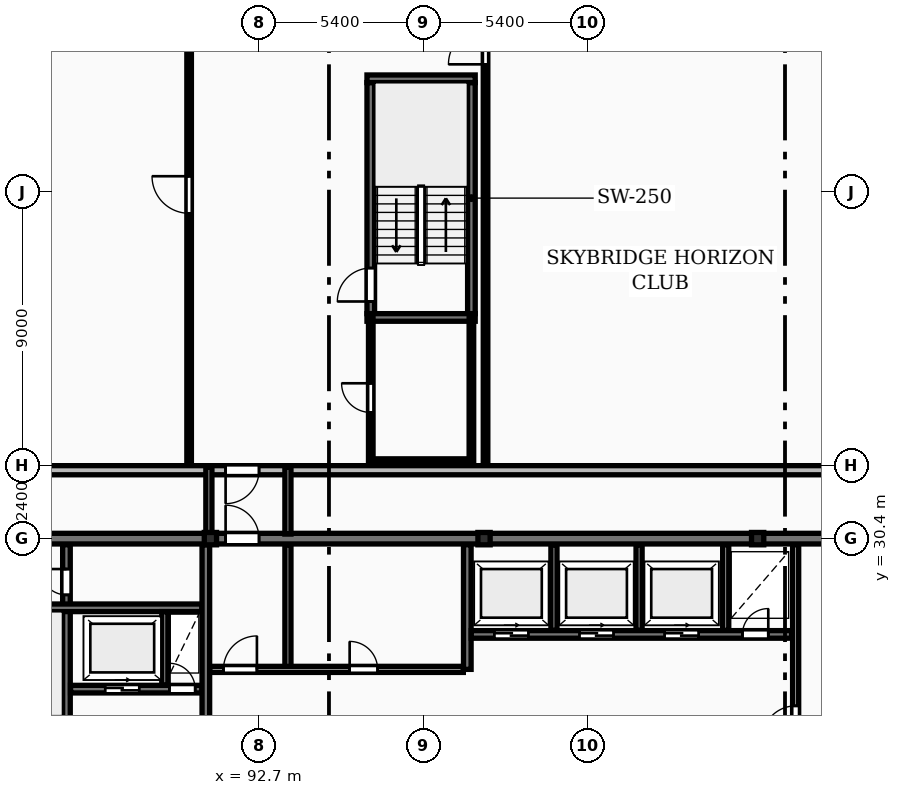
"""IFC4 building model, lengths in metres.
Left out: names, types, materials, properties, quantities, classifications, styles, units other than length and angle.
Written with IfcOpenShell. Run it as: python <this file> out.ifc"""

import sys

from ifc_helpers import new_model, si_unit, direction, frame, frame_2d, origin, origin_2d, place, context, subcontext, project, spatial, rectangle, i_section, extrude, element, fill, save


model = new_model("IFC4")
c1 = context("Model", 3, precision=1e-05, world=origin(), true_north=direction((0.0, 1.0)))
c2 = subcontext(c1, "Body", "Model", "MODEL_VIEW")
j1 = project(units=[si_unit("LENGTHUNIT", "METRE"), si_unit("PLANEANGLEUNIT", "RADIAN")], contexts=[c1])
p1 = place(None, origin())
s1 = spatial("IfcSite", under=j1, at=p1, CompositionType="ELEMENT")
p2 = place(p1, origin())
s2 = spatial("IfcBuilding", under=s1, at=p2, CompositionType="ELEMENT")
p3 = place(p2, frame((0.0, 0.0, 146.5)))
s3 = spatial("IfcBuildingStorey", under=s2, at=p3, CompositionType="ELEMENT", Elevation=146.5)
for number, where, z_axis, x_axis in (
    (1, (91.1, 30.4, 0.0), (0.0, 0.0, 1.0), (1.0, 0.0, 0.0)),
    (2, (100.1, 30.4, 0.0), (0.0, 0.0, 1.0), (1.0, 0.0, 0.0)),
    (3, (109.1, 30.4, 0.0), (0.0, 0.0, 1.0), (1.0, 0.0, 0.0)),
):
    element("IfcColumn", number, at=place(p3, frame(where, z_axis=z_axis, x_axis=x_axis)), inside=s3, PredefinedType="COLUMN", context=c2, shape_type="SweptSolid", body=[
        extrude(i_section(OverallWidth=0.403, OverallDepth=0.406, WebThickness=0.027, FlangeThickness=0.043, FilletRadius=0.015, at=origin_2d()), origin(), (0.0, 0.0, 1.0), 3.6),
    ])
p4 = place(p3, frame((130.7, 32.65, 0.0), z_axis=(0.0, 0.0, 1.0), x_axis=(-1.0, 0.0, 0.0)))
e4 = element("IfcWall", 4, at=p4, inside=s3, PredefinedType="STANDARD", context=c2, shape_type="SweptSolid", body=[
    extrude(rectangle(XDim=58.0, YDim=0.3, at=frame_2d((29.0, 0.0))), origin(), (0.0, 0.0, 1.0), 3.31),
])
p5 = place(p4, frame((50.125, 0.0, 0.85)))
e5 = element("IfcOpeningElement", 5, at=p5, cuts=e4, PredefinedType="OPENING", context=c2, shape_type="SweptSolid", body=[
    extrude(rectangle(XDim=1.8, YDim=1.8, at=frame_2d((0.9, 0.9))), frame((0.0, 0.16, 0.0), z_axis=(0.0, -1.0, 0.0), x_axis=(1.0, 0.0, 0.0)), (0.0, 0.0, 1.0), 0.32),
])
p6 = place(p4, frame((6.775, 0.0, 0.85)))
e6 = element("IfcOpeningElement", 6, at=p6, cuts=e4, PredefinedType="OPENING", context=c2, shape_type="SweptSolid", body=[
    extrude(rectangle(XDim=1.8, YDim=1.8, at=frame_2d((0.9, 0.9))), frame((0.0, 0.16, 0.0), z_axis=(0.0, -1.0, 0.0), x_axis=(1.0, 0.0, 0.0)), (0.0, 0.0, 1.0), 0.32),
])
p7 = place(p4, frame((38.0, 0.0, 0.0)))
e7 = element("IfcOpeningElement", 7, at=p7, cuts=e4, PredefinedType="OPENING", context=c2, shape_type="SweptSolid", body=[
    extrude(rectangle(XDim=1.1, YDim=2.1, at=frame_2d((0.55, 1.05))), frame((0.0, 0.16, 0.0), z_axis=(0.0, -1.0, 0.0), x_axis=(1.0, 0.0, 0.0)), (0.0, 0.0, 1.0), 0.32),
])
p8 = place(p3, frame((81.925, 30.4, 0.0), z_axis=(0.0, 0.0, 1.0), x_axis=(1.0, 0.0, 0.0)))
e8 = element("IfcWall", 8, at=p8, inside=s3, PredefinedType="SHEAR", context=c2, shape_type="SweptSolid", body=[
    extrude(rectangle(XDim=36.265, YDim=0.35, at=frame_2d((18.132, 0.0))), origin(), (0.0, 0.0, 1.0), 3.6),
])
p9 = place(p8, frame((9.675, 0.0, 0.0)))
e9 = element("IfcOpeningElement", 9, at=p9, cuts=e8, PredefinedType="OPENING", context=c2, shape_type="SweptSolid", body=[
    extrude(rectangle(XDim=1.1, YDim=2.1, at=frame_2d((0.55, 1.05))), frame((0.0, 0.185, 0.0), z_axis=(0.0, -1.0, 0.0), x_axis=(1.0, 0.0, 0.0)), (0.0, 0.0, 1.0), 0.37),
])
p10 = place(p3, frame((86.365, 18.6, 0.0), z_axis=(0.0, 0.0, 1.0), x_axis=(0.0, 1.0, 0.0)))
e10 = element("IfcWall", 10, at=p10, inside=s3, PredefinedType="SHEAR", context=c2, shape_type="SweptSolid", body=[
    extrude(rectangle(XDim=11.6, YDim=0.25, at=frame_2d((5.8, 0.0))), origin(), (0.0, 0.0, 1.0), 3.6),
])
p11 = place(p10, frame((0.45, 0.0, 0.0)))
e11 = element("IfcOpeningElement", 11, at=p11, cuts=e10, PredefinedType="OPENING", context=c2, shape_type="SweptSolid", body=[
    extrude(rectangle(XDim=0.85, YDim=2.05, at=frame_2d((0.425, 1.025))), frame((0.0, 0.135, 0.0), z_axis=(0.0, -1.0, 0.0), x_axis=(1.0, 0.0, 0.0)), (0.0, 0.0, 1.0), 0.27),
])
p12 = place(p10, frame((2.05, 0.0, 0.0)))
e12 = element("IfcOpeningElement", 12, at=p12, cuts=e10, PredefinedType="OPENING", context=c2, shape_type="SweptSolid", body=[
    extrude(rectangle(XDim=1.1, YDim=2.1, at=frame_2d((0.55, 1.05))), frame((0.0, 0.135, 0.0), z_axis=(0.0, -1.0, 0.0), x_axis=(1.0, 0.0, 0.0)), (0.0, 0.0, 1.0), 0.27),
])
p13 = place(p10, frame((9.95, 0.0, 0.0)))
e13 = element("IfcOpeningElement", 13, at=p13, cuts=e10, PredefinedType="OPENING", context=c2, shape_type="SweptSolid", body=[
    extrude(rectangle(XDim=0.85, YDim=2.05, at=frame_2d((0.425, 1.025))), frame((0.0, 0.135, 0.0), z_axis=(0.0, -1.0, 0.0), x_axis=(1.0, 0.0, 0.0)), (0.0, 0.0, 1.0), 0.27),
])
p14 = place(p3, frame((83.0, 28.125, 0.0), z_axis=(0.0, 0.0, 1.0), x_axis=(1.0, 0.0, 0.0)))
e14 = element("IfcWall", 14, at=p14, inside=s3, PredefinedType="SHEAR", context=c2, shape_type="SweptSolid", body=[
    extrude(rectangle(XDim=7.82, YDim=0.25, at=frame_2d((3.91, 0.0))), origin(), (0.0, 0.0, 1.0), 3.6),
])
p15 = place(p3, frame((86.5, 25.45, 0.0), z_axis=(0.0, 0.0, 1.0), x_axis=(1.0, 0.0, 0.0)))
e15 = element("IfcWall", 15, at=p15, inside=s3, PredefinedType="SHEAR", context=c2, shape_type="SweptSolid", body=[
    extrude(rectangle(XDim=4.32, YDim=0.25, at=frame_2d((2.16, 0.0))), origin(), (0.0, 0.0, 1.0), 3.6),
])
p16 = place(p15, frame((1.14, 0.0, 0.0)))
e16 = element("IfcOpeningElement", 16, at=p16, cuts=e15, PredefinedType="OPENING", context=c2, shape_type="SweptSolid", body=[
    extrude(rectangle(XDim=1.12, YDim=2.12, at=frame_2d((0.56, 1.06))), frame((0.0, 0.135, 0.0), z_axis=(0.0, -1.0, 0.0), x_axis=(1.0, 0.0, 0.0)), (0.0, 0.0, 1.0), 0.27),
])
p17 = place(p15, frame((3.25, 0.0, 0.0)))
e17 = element("IfcOpeningElement", 17, at=p17, cuts=e15, PredefinedType="OPENING", context=c2, shape_type="SweptSolid", body=[
    extrude(rectangle(XDim=0.85, YDim=2.05, at=frame_2d((0.425, 1.025))), frame((0.0, 0.135, 0.0), z_axis=(0.0, -1.0, 0.0), x_axis=(1.0, 0.0, 0.0)), (0.0, 0.0, 1.0), 0.27),
])
p18 = place(p3, frame((89.6, 25.58, 0.0), z_axis=(0.0, 0.0, 1.0), x_axis=(0.0, 1.0, 0.0)))
e18 = element("IfcWall", 18, at=p18, inside=s3, PredefinedType="PARTITIONING", context=c2, shape_type="SweptSolid", body=[
    extrude(rectangle(XDim=2.42, YDim=0.2, at=frame_2d((1.21, 0.0))), origin(), (0.0, 0.0, 1.0), 3.31),
])
p19 = place(p3, frame((90.95, 18.6, 0.0), z_axis=(0.0, 0.0, 1.0), x_axis=(0.0, 1.0, 0.0)))
e19 = element("IfcWall", 19, at=p19, inside=s3, PredefinedType="SHEAR", context=c2, shape_type="SweptSolid", body=[
    extrude(rectangle(XDim=11.6, YDim=0.25, at=frame_2d((5.8, 0.0))), origin(), (0.0, 0.0, 1.0), 3.6),
])
p20 = place(p19, frame((4.6, 0.0, 0.0)))
e20 = element("IfcOpeningElement", 20, at=p20, cuts=e19, PredefinedType="OPENING", context=c2, shape_type="SweptSolid", body=[
    extrude(rectangle(XDim=1.1, YDim=2.1, at=frame_2d((0.55, 1.05))), frame((0.0, 0.135, 0.0), z_axis=(0.0, -1.0, 0.0), x_axis=(1.0, 0.0, 0.0)), (0.0, 0.0, 1.0), 0.27),
])
p21 = place(p3, frame((93.65, 26.1, 0.0), z_axis=(0.0, 0.0, 1.0), x_axis=(0.0, 1.0, 0.0)))
e21 = element("IfcWall", 21, at=p21, inside=s3, PredefinedType="PARTITIONING", context=c2, shape_type="SweptSolid", body=[
    extrude(rectangle(XDim=4.1, YDim=0.2, at=frame_2d((2.05, 0.0))), origin(), (0.0, 0.0, 1.0), 3.31),
])
p22 = place(p3, frame((91.08, 26.1, 0.0), z_axis=(0.0, 0.0, 1.0), x_axis=(1.0, 0.0, 0.0)))
e22 = element("IfcWall", 22, at=p22, inside=s3, PredefinedType="PARTITIONING", context=c2, shape_type="SweptSolid", body=[
    extrude(rectangle(XDim=8.34, YDim=0.2, at=frame_2d((4.17, 0.0))), origin(), (0.0, 0.0, 1.0), 3.31),
])
p23 = place(p22, frame((0.45, 0.0, 0.0)))
e23 = element("IfcOpeningElement", 23, at=p23, cuts=e22, PredefinedType="OPENING", context=c2, shape_type="SweptSolid", body=[
    extrude(rectangle(XDim=1.1, YDim=2.1, at=frame_2d((0.55, 1.05))), frame((0.0, 0.11, 0.0), z_axis=(0.0, -1.0, 0.0), x_axis=(1.0, 0.0, 0.0)), (0.0, 0.0, 1.0), 0.22),
])
p24 = place(p22, frame((4.6, 0.0, 0.0)))
e24 = element("IfcOpeningElement", 24, at=p24, cuts=e22, PredefinedType="OPENING", context=c2, shape_type="SweptSolid", body=[
    extrude(rectangle(XDim=0.92, YDim=2.08, at=frame_2d((0.46, 1.04))), frame((0.0, 0.11, 0.0), z_axis=(0.0, -1.0, 0.0), x_axis=(1.0, 0.0, 0.0)), (0.0, 0.0, 1.0), 0.22),
])
p25 = place(p3, frame((99.55, 26.1, 0.0), z_axis=(0.0, 0.0, 1.0), x_axis=(0.0, 1.0, 0.0)))
e25 = element("IfcWall", 25, at=p25, inside=s3, PredefinedType="SHEAR", context=c2, shape_type="SweptSolid", body=[
    extrude(rectangle(XDim=4.1, YDim=0.25, at=frame_2d((2.05, 0.0))), origin(), (0.0, 0.0, 1.0), 3.6),
])
for number, where, z_axis, x_axis in (
    (26, (102.4, 27.38, 0.0), (0.0, 0.0, 1.0), (0.0, 1.0, 0.0)),
    (27, (105.2, 27.38, 0.0), (0.0, 0.0, 1.0), (0.0, 1.0, 0.0)),
    (28, (108.05, 27.38, 0.0), (0.0, 0.0, 1.0), (0.0, 1.0, 0.0)),
):
    element("IfcWall", number, at=place(p3, frame(where, z_axis=z_axis, x_axis=x_axis)), inside=s3, PredefinedType="PARTITIONING", context=c2, shape_type="SweptSolid", body=[
        extrude(rectangle(XDim=2.82, YDim=0.2, at=frame_2d((1.41, 0.0))), origin(), (0.0, 0.0, 1.0), 3.31),
    ])
p26 = place(p3, frame((99.68, 27.25, 0.0), z_axis=(0.0, 0.0, 1.0), x_axis=(1.0, 0.0, 0.0)))
e29 = element("IfcWall", 29, at=p26, inside=s3, PredefinedType="SHEAR", context=c2, shape_type="SweptSolid", body=[
    extrude(rectangle(XDim=10.54, YDim=0.25, at=frame_2d((5.27, 0.0))), origin(), (0.0, 0.0, 1.0), 3.6),
])
p27 = place(p26, frame((0.76, 0.0, 0.0)))
e30 = element("IfcOpeningElement", 30, at=p27, cuts=e29, PredefinedType="OPENING", context=c2, shape_type="SweptSolid", body=[
    extrude(rectangle(XDim=1.12, YDim=2.12, at=frame_2d((0.56, 1.06))), frame((0.0, 0.135, 0.0), z_axis=(0.0, -1.0, 0.0), x_axis=(1.0, 0.0, 0.0)), (0.0, 0.0, 1.0), 0.27),
])
p28 = place(p26, frame((3.56, 0.0, 0.0)))
e31 = element("IfcOpeningElement", 31, at=p28, cuts=e29, PredefinedType="OPENING", context=c2, shape_type="SweptSolid", body=[
    extrude(rectangle(XDim=1.12, YDim=2.12, at=frame_2d((0.56, 1.06))), frame((0.0, 0.135, 0.0), z_axis=(0.0, -1.0, 0.0), x_axis=(1.0, 0.0, 0.0)), (0.0, 0.0, 1.0), 0.27),
])
p29 = place(p26, frame((6.36, 0.0, 0.0)))
e32 = element("IfcOpeningElement", 32, at=p29, cuts=e29, PredefinedType="OPENING", context=c2, shape_type="SweptSolid", body=[
    extrude(rectangle(XDim=1.12, YDim=2.12, at=frame_2d((0.56, 1.06))), frame((0.0, 0.135, 0.0), z_axis=(0.0, -1.0, 0.0), x_axis=(1.0, 0.0, 0.0)), (0.0, 0.0, 1.0), 0.27),
])
p30 = place(p26, frame((8.92, 0.0, 0.0)))
e33 = element("IfcOpeningElement", 33, at=p30, cuts=e29, PredefinedType="OPENING", context=c2, shape_type="SweptSolid", body=[
    extrude(rectangle(XDim=0.85, YDim=2.05, at=frame_2d((0.425, 1.025))), frame((0.0, 0.135, 0.0), z_axis=(0.0, -1.0, 0.0), x_axis=(1.0, 0.0, 0.0)), (0.0, 0.0, 1.0), 0.27),
])
p31 = place(p3, frame((110.35, 18.6, 0.0), z_axis=(0.0, 0.0, 1.0), x_axis=(0.0, 1.0, 0.0)))
e34 = element("IfcWall", 34, at=p31, inside=s3, PredefinedType="PARTITIONING", context=c2, shape_type="SweptSolid", body=[
    extrude(rectangle(XDim=11.6, YDim=0.2, at=frame_2d((5.8, 0.0))), origin(), (0.0, 0.0, 1.0), 3.31),
])
p32 = place(p31, frame((5.2, 0.0, 0.0)))
e35 = element("IfcOpeningElement", 35, at=p32, cuts=e34, PredefinedType="OPENING", context=c2, shape_type="SweptSolid", body=[
    extrude(rectangle(XDim=1.1, YDim=2.15, at=frame_2d((0.55, 1.075))), frame((0.0, 0.11, 0.0), z_axis=(0.0, -1.0, 0.0), x_axis=(1.0, 0.0, 0.0)), (0.0, 0.0, 1.0), 0.22),
])
p33 = place(p3, frame((91.05, 30.55, 0.0), z_axis=(0.0, 0.0, 1.0), x_axis=(0.0, 1.0, 0.0)))
e36 = element("IfcWall", 36, at=p33, inside=s3, PredefinedType="PARTITIONING", context=c2, shape_type="SweptSolid", body=[
    extrude(rectangle(XDim=2.2, YDim=0.2, at=frame_2d((1.1, 0.0))), origin(), (0.0, 0.0, 1.0), 3.31),
])
p34 = place(p3, frame((93.65, 30.55, 0.0), z_axis=(0.0, 0.0, 1.0), x_axis=(0.0, 1.0, 0.0)))
e37 = element("IfcWall", 37, at=p34, inside=s3, PredefinedType="PARTITIONING", context=c2, shape_type="SweptSolid", body=[
    extrude(rectangle(XDim=2.2, YDim=0.2, at=frame_2d((1.1, 0.0))), origin(), (0.0, 0.0, 1.0), 2.383),
])
p35 = place(p3, frame((96.375, 37.8, 0.0), z_axis=(0.0, 0.0, 1.0), x_axis=(0.0, 1.0, 0.0)))
e38 = element("IfcWall", 38, at=p35, inside=s3, PredefinedType="SHEAR", context=c2, shape_type="SweptSolid", body=[
    extrude(rectangle(XDim=7.6, YDim=0.25, at=frame_2d((3.8, 0.0))), origin(), (0.0, 0.0, 1.0), 3.6),
])
p36 = place(p35, frame((0.4, 0.0, 0.0)))
e39 = element("IfcOpeningElement", 39, at=p36, cuts=e38, PredefinedType="OPENING", context=c2, shape_type="SweptSolid", body=[
    extrude(rectangle(XDim=1.1, YDim=2.1, at=frame_2d((0.55, 1.05))), frame((0.0, 0.135, 0.0), z_axis=(0.0, -1.0, 0.0), x_axis=(1.0, 0.0, 0.0)), (0.0, 0.0, 1.0), 0.27),
])
p37 = place(p3, frame((99.685, 37.8, 0.0), z_axis=(0.0, 0.0, 1.0), x_axis=(0.0, 1.0, 0.0)))
e40 = element("IfcWall", 40, at=p37, inside=s3, PredefinedType="SHEAR", context=c2, shape_type="SweptSolid", body=[
    extrude(rectangle(XDim=7.6, YDim=0.25, at=frame_2d((3.8, 0.0))), origin(), (0.0, 0.0, 1.0), 3.6),
])
for number, where, z_axis, x_axis in (
    (41, (96.25, 37.675, 0.0), (0.0, 0.0, 1.0), (1.0, 0.0, 0.0)),
    (42, (96.25, 45.525, 0.0), (0.0, 0.0, 1.0), (1.0, 0.0, 0.0)),
):
    element("IfcWall", number, at=place(p3, frame(where, z_axis=z_axis, x_axis=x_axis)), inside=s3, PredefinedType="SHEAR", context=c2, shape_type="SweptSolid", body=[
        extrude(rectangle(XDim=3.56, YDim=0.25, at=frame_2d((1.78, 0.0))), origin(), (0.0, 0.0, 1.0), 3.6),
    ])
p38 = place(p3, frame((96.375, 32.95, 0.0), z_axis=(0.0, 0.0, 1.0), x_axis=(1.0, 0.0, 0.0)))
e43 = element("IfcWall", 43, at=p38, inside=s3, PredefinedType="PARTITIONING", context=c2, shape_type="SweptSolid", body=[
    extrude(rectangle(XDim=3.31, YDim=0.15, at=frame_2d((1.655, 0.0))), origin(), (0.0, 0.0, 1.0), 2.69),
])
p39 = place(p3, frame((96.375, 32.95, 0.0), z_axis=(0.0, 0.0, 1.0), x_axis=(0.0, 1.0, 0.0)))
e44 = element("IfcWall", 44, at=p39, inside=s3, PredefinedType="PARTITIONING", context=c2, shape_type="SweptSolid", body=[
    extrude(rectangle(XDim=4.725, YDim=0.15, at=frame_2d((2.363, 0.0))), origin(), (0.0, 0.0, 1.0), 2.383),
])
p40 = place(p39, frame((1.6, 0.0, 0.0)))
e45 = element("IfcOpeningElement", 45, at=p40, cuts=e44, PredefinedType="OPENING", context=c2, shape_type="SweptSolid", body=[
    extrude(rectangle(XDim=0.96, YDim=2.1, at=frame_2d((0.48, 1.05))), frame((0.0, 0.085, 0.0), z_axis=(0.0, -1.0, 0.0), x_axis=(1.0, 0.0, 0.0)), (0.0, 0.0, 1.0), 0.17),
])
p41 = place(p3, frame((99.685, 32.95, 0.0), z_axis=(0.0, 0.0, 1.0), x_axis=(0.0, 1.0, 0.0)))
e46 = element("IfcWall", 46, at=p41, inside=s3, PredefinedType="PARTITIONING", context=c2, shape_type="SweptSolid", body=[
    extrude(rectangle(XDim=4.725, YDim=0.15, at=frame_2d((2.363, 0.0))), origin(), (0.0, 0.0, 1.0), 2.383),
])
p42 = place(p3, frame((90.4, 32.9, 0.0), z_axis=(0.0, 0.0, 1.0), x_axis=(0.0, 1.0, 0.0)))
e47 = element("IfcWall", 47, at=p42, inside=s3, PredefinedType="PARTITIONING", context=c2, shape_type="SweptSolid", body=[
    extrude(rectangle(XDim=17.8, YDim=0.15, at=frame_2d((8.9, 0.0))), origin(), (0.0, 0.0, 1.0), 3.31),
])
p43 = place(p42, frame((8.2, 0.0, 0.0)))
e48 = element("IfcOpeningElement", 48, at=p43, cuts=e47, PredefinedType="OPENING", context=c2, shape_type="SweptSolid", body=[
    extrude(rectangle(XDim=1.22, YDim=2.18, at=frame_2d((0.61, 1.09))), frame((0.0, 0.085, 0.0), z_axis=(0.0, -1.0, 0.0), x_axis=(1.0, 0.0, 0.0)), (0.0, 0.0, 1.0), 0.17),
])
p44 = place(p3, frame((100.15, 32.9, 0.0), z_axis=(0.0, 0.0, 1.0), x_axis=(0.0, 1.0, 0.0)))
e49 = element("IfcWall", 49, at=p44, inside=s3, PredefinedType="PARTITIONING", context=c2, shape_type="SweptSolid", body=[
    extrude(rectangle(XDim=17.8, YDim=0.15, at=frame_2d((8.9, 0.0))), origin(), (0.0, 0.0, 1.0), 3.31),
])
p45 = place(p44, frame((13.1, 0.0, 0.0)))
e50 = element("IfcOpeningElement", 50, at=p45, cuts=e49, PredefinedType="OPENING", context=c2, shape_type="SweptSolid", body=[
    extrude(rectangle(XDim=1.22, YDim=2.18, at=frame_2d((0.61, 1.09))), frame((0.0, 0.085, 0.0), z_axis=(0.0, -1.0, 0.0), x_axis=(1.0, 0.0, 0.0)), (0.0, 0.0, 1.0), 0.17),
])
p46 = place(p7, origin())
e51 = element("IfcDoor", 51, at=p46, inside=s3, OperationType="SINGLE_SWING_RIGHT", PredefinedType="DOOR", context=c2, shape_type="SweptSolid", body=[
    extrude(rectangle(XDim=1.1, YDim=2.1, at=frame_2d((0.55, 1.05))), frame((0.0, 0.025, 0.0), z_axis=(0.0, -1.0, 0.0), x_axis=(1.0, 0.0, 0.0)), (0.0, 0.0, 1.0), 0.05),
])
fill(e7, e51)
p47 = place(p9, origin())
e52 = element("IfcDoor", 52, at=p47, inside=s3, OperationType="SINGLE_SWING_LEFT", PredefinedType="DOOR", context=c2, shape_type="SweptSolid", body=[
    extrude(rectangle(XDim=1.1, YDim=2.1, at=frame_2d((0.55, 1.05))), frame((0.0, 0.025, 0.0), z_axis=(0.0, -1.0, 0.0), x_axis=(1.0, 0.0, 0.0)), (0.0, 0.0, 1.0), 0.05),
])
fill(e9, e52)
p48 = place(p13, origin())
e53 = element("IfcDoor", 53, at=p48, inside=s3, OperationType="SINGLE_SWING_RIGHT", PredefinedType="DOOR", context=c2, shape_type="SweptSolid", body=[
    extrude(rectangle(XDim=0.85, YDim=2.05, at=frame_2d((0.425, 1.025))), frame((0.0, 0.025, 0.0), z_axis=(0.0, -1.0, 0.0), x_axis=(1.0, 0.0, 0.0)), (0.0, 0.0, 1.0), 0.05),
])
fill(e13, e53)
p49 = place(p16, origin())
e54 = element("IfcDoor", 54, at=p49, inside=s3, OperationType="SLIDING_TO_RIGHT", PredefinedType="DOOR", context=c2, shape_type="SweptSolid", body=[
    extrude(rectangle(XDim=1.12, YDim=2.12, at=frame_2d((0.56, 1.06))), frame((0.0, 0.025, 0.0), z_axis=(0.0, -1.0, 0.0), x_axis=(1.0, 0.0, 0.0)), (0.0, 0.0, 1.0), 0.05),
])
fill(e16, e54)
p50 = place(p17, origin())
e55 = element("IfcDoor", 55, at=p50, inside=s3, OperationType="SINGLE_SWING_LEFT", PredefinedType="DOOR", context=c2, shape_type="SweptSolid", body=[
    extrude(rectangle(XDim=0.85, YDim=2.05, at=frame_2d((0.425, 1.025))), frame((0.0, 0.025, 0.0), z_axis=(0.0, -1.0, 0.0), x_axis=(1.0, 0.0, 0.0)), (0.0, 0.0, 1.0), 0.05),
])
fill(e17, e55)
p51 = place(p23, origin())
e56 = element("IfcDoor", 56, at=p51, inside=s3, OperationType="SINGLE_SWING_RIGHT", PredefinedType="DOOR", context=c2, shape_type="SweptSolid", body=[
    extrude(rectangle(XDim=1.1, YDim=2.1, at=frame_2d((0.55, 1.05))), frame((0.0, 0.025, 0.0), z_axis=(0.0, -1.0, 0.0), x_axis=(1.0, 0.0, 0.0)), (0.0, 0.0, 1.0), 0.05),
])
fill(e23, e56)
p52 = place(p24, origin())
e57 = element("IfcDoor", 57, at=p52, inside=s3, OperationType="SINGLE_SWING_LEFT", PredefinedType="DOOR", context=c2, shape_type="SweptSolid", body=[
    extrude(rectangle(XDim=0.92, YDim=2.08, at=frame_2d((0.46, 1.04))), frame((0.0, 0.025, 0.0), z_axis=(0.0, -1.0, 0.0), x_axis=(1.0, 0.0, 0.0)), (0.0, 0.0, 1.0), 0.05),
])
fill(e24, e57)
p53 = place(p27, origin())
e58 = element("IfcDoor", 58, at=p53, inside=s3, OperationType="SLIDING_TO_RIGHT", PredefinedType="DOOR", context=c2, shape_type="SweptSolid", body=[
    extrude(rectangle(XDim=1.12, YDim=2.12, at=frame_2d((0.56, 1.06))), frame((0.0, 0.025, 0.0), z_axis=(0.0, -1.0, 0.0), x_axis=(1.0, 0.0, 0.0)), (0.0, 0.0, 1.0), 0.05),
])
fill(e30, e58)
p54 = place(p28, origin())
e59 = element("IfcDoor", 59, at=p54, inside=s3, OperationType="SLIDING_TO_RIGHT", PredefinedType="DOOR", context=c2, shape_type="SweptSolid", body=[
    extrude(rectangle(XDim=1.12, YDim=2.12, at=frame_2d((0.56, 1.06))), frame((0.0, 0.025, 0.0), z_axis=(0.0, -1.0, 0.0), x_axis=(1.0, 0.0, 0.0)), (0.0, 0.0, 1.0), 0.05),
])
fill(e31, e59)
p55 = place(p29, origin())
e60 = element("IfcDoor", 60, at=p55, inside=s3, OperationType="SLIDING_TO_RIGHT", PredefinedType="DOOR", context=c2, shape_type="SweptSolid", body=[
    extrude(rectangle(XDim=1.12, YDim=2.12, at=frame_2d((0.56, 1.06))), frame((0.0, 0.025, 0.0), z_axis=(0.0, -1.0, 0.0), x_axis=(1.0, 0.0, 0.0)), (0.0, 0.0, 1.0), 0.05),
])
fill(e32, e60)
p56 = place(p30, origin())
e61 = element("IfcDoor", 61, at=p56, inside=s3, OperationType="SINGLE_SWING_RIGHT", PredefinedType="DOOR", context=c2, shape_type="SweptSolid", body=[
    extrude(rectangle(XDim=0.85, YDim=2.05, at=frame_2d((0.425, 1.025))), frame((0.0, 0.025, 0.0), z_axis=(0.0, -1.0, 0.0), x_axis=(1.0, 0.0, 0.0)), (0.0, 0.0, 1.0), 0.05),
])
fill(e33, e61)
p57 = place(p32, origin())
e62 = element("IfcDoor", 62, at=p57, inside=s3, OperationType="SINGLE_SWING_LEFT", PredefinedType="DOOR", context=c2, shape_type="SweptSolid", body=[
    extrude(rectangle(XDim=1.1, YDim=2.15, at=frame_2d((0.55, 1.075))), frame((0.0, 0.025, 0.0), z_axis=(0.0, -1.0, 0.0), x_axis=(1.0, 0.0, 0.0)), (0.0, 0.0, 1.0), 0.05),
])
fill(e35, e62)
p58 = place(p36, origin())
e63 = element("IfcDoor", 63, at=p58, inside=s3, OperationType="SINGLE_SWING_LEFT", PredefinedType="DOOR", context=c2, shape_type="SweptSolid", body=[
    extrude(rectangle(XDim=1.1, YDim=2.1, at=frame_2d((0.55, 1.05))), frame((0.0, 0.025, 0.0), z_axis=(0.0, -1.0, 0.0), x_axis=(1.0, 0.0, 0.0)), (0.0, 0.0, 1.0), 0.05),
])
fill(e39, e63)
p59 = place(p40, origin())
e64 = element("IfcDoor", 64, at=p59, inside=s3, OperationType="SINGLE_SWING_RIGHT", PredefinedType="DOOR", context=c2, shape_type="SweptSolid", body=[
    extrude(rectangle(XDim=0.96, YDim=2.1, at=frame_2d((0.48, 1.05))), frame((0.0, 0.025, 0.0), z_axis=(0.0, -1.0, 0.0), x_axis=(1.0, 0.0, 0.0)), (0.0, 0.0, 1.0), 0.05),
])
fill(e45, e64)
p60 = place(p43, origin())
e65 = element("IfcDoor", 65, at=p60, inside=s3, OperationType="SINGLE_SWING_RIGHT", PredefinedType="DOOR", context=c2, shape_type="SweptSolid", body=[
    extrude(rectangle(XDim=1.22, YDim=2.18, at=frame_2d((0.61, 1.09))), frame((0.0, 0.025, 0.0), z_axis=(0.0, -1.0, 0.0), x_axis=(1.0, 0.0, 0.0)), (0.0, 0.0, 1.0), 0.05),
])
fill(e48, e65)
p61 = place(p45, origin())
e66 = element("IfcDoor", 66, at=p61, inside=s3, OperationType="SINGLE_SWING_LEFT", PredefinedType="DOOR", context=c2, shape_type="SweptSolid", body=[
    extrude(rectangle(XDim=1.22, YDim=2.18, at=frame_2d((0.61, 1.09))), frame((0.0, 0.025, 0.0), z_axis=(0.0, -1.0, 0.0), x_axis=(1.0, 0.0, 0.0)), (0.0, 0.0, 1.0), 0.05),
])
fill(e50, e66)
save(model, sys.argv[1])
